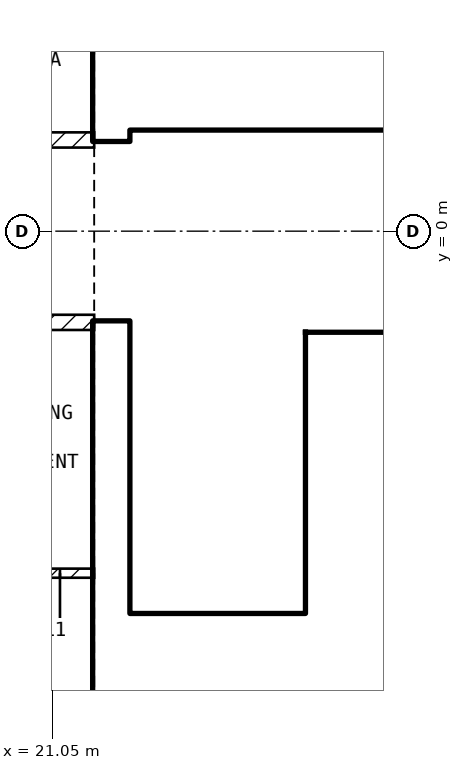
"""IFC4 building model, lengths in metres.
Left out: names, types, materials, properties, quantities, classifications, styles, units other than length and angle.
Written with IfcOpenShell. Run it as: python <this file> out.ifc"""

import sys

from ifc_helpers import new_model, si_unit, direction, frame, frame_2d, origin, place, context, subcontext, project, spatial, rectangle, extrude, element, fill, save


model = new_model("IFC4")
c1 = context("Model", 3, precision=1e-05, world=origin(), true_north=direction((0.0, 1.0)))
c2 = subcontext(c1, "Body", "Model", "MODEL_VIEW")
j1 = project(units=[si_unit("LENGTHUNIT", "METRE"), si_unit("PLANEANGLEUNIT", "RADIAN")], contexts=[c1])
p1 = place(None, origin())
s1 = spatial("IfcSite", under=j1, at=p1, CompositionType="ELEMENT")
p2 = place(p1, origin())
s2 = spatial("IfcBuilding", under=s1, at=p2, CompositionType="ELEMENT")
p3 = place(p2, frame((0.0, 0.0, 177.1)))
s3 = spatial("IfcBuildingStorey", under=s2, at=p3, CompositionType="ELEMENT", Elevation=177.1)
for number, where, z_axis, x_axis in (
    (1, (21.825, -8.1, 0.0), (0.0, 0.0, 1.0), (0.0, 1.0, 0.0)),
    (2, (21.825, 1.2, 0.0), (0.0, 0.0, 1.0), (0.0, 1.0, 0.0)),
):
    element("IfcWall", number, at=place(p3, frame(where, z_axis=z_axis, x_axis=x_axis)), inside=s3, PredefinedType="SHEAR", context=c2, shape_type="SweptSolid", body=[
        extrude(rectangle(XDim=6.9, YDim=0.45, at=frame_2d((3.45, 0.0))), origin(), (0.0, 0.0, 1.0), 3.25),
    ])
p4 = place(p3, frame((22.05, 1.45, 0.0), z_axis=(0.0, 0.0, 1.0), x_axis=(1.0, 0.0, 0.0)))
e3 = element("IfcWall", 3, at=p4, inside=s3, PredefinedType="SOLIDWALL", context=c2, shape_type="SweptSolid", body=[
    extrude(rectangle(XDim=11.15, YDim=0.2, at=frame_2d((5.575, 0.0))), origin(), (0.0, 0.0, 1.0), 3.25),
])
p5 = place(p4, frame((0.75, 0.0, 0.0)))
e4 = element("IfcOpeningElement", 4, at=p5, cuts=e3, PredefinedType="OPENING", context=c2, shape_type="SweptSolid", body=[
    extrude(rectangle(XDim=1.0, YDim=2.1, at=frame_2d((0.5, 1.05))), frame((0.0, 0.11, 0.0), z_axis=(0.0, -1.0, 0.0), x_axis=(1.0, 0.0, 0.0)), (0.0, 0.0, 1.0), 0.22),
])
p6 = place(p4, frame((3.25, 0.0, 0.0)))
e5 = element("IfcOpeningElement", 5, at=p6, cuts=e3, PredefinedType="OPENING", context=c2, shape_type="SweptSolid", body=[
    extrude(rectangle(XDim=1.0, YDim=2.1, at=frame_2d((0.5, 1.05))), frame((0.0, 0.11, 0.0), z_axis=(0.0, -1.0, 0.0), x_axis=(1.0, 0.0, 0.0)), (0.0, 0.0, 1.0), 0.22),
])
p7 = place(p4, frame((9.15, 0.0, 0.0)))
e6 = element("IfcOpeningElement", 6, at=p7, cuts=e3, PredefinedType="OPENING", context=c2, shape_type="SweptSolid", body=[
    extrude(rectangle(XDim=0.9, YDim=2.1, at=frame_2d((0.45, 1.05))), frame((0.0, 0.11, 0.0), z_axis=(0.0, -1.0, 0.0), x_axis=(1.0, 0.0, 0.0)), (0.0, 0.0, 1.0), 0.22),
])
p8 = place(p3, frame((24.5, -5.05, 0.0), z_axis=(0.0, 0.0, 1.0), x_axis=(0.0, 1.0, 0.0)))
e7 = element("IfcWall", 7, at=p8, inside=s3, PredefinedType="SOLIDWALL", context=c2, shape_type="SweptSolid", body=[
    extrude(rectangle(XDim=3.7, YDim=0.2, at=frame_2d((1.85, 0.0))), origin(), (0.0, 0.0, 1.0), 3.25),
])
p9 = place(p8, frame((0.1, 0.0, 0.0)))
e8 = element("IfcOpeningElement", 8, at=p9, cuts=e7, PredefinedType="OPENING", context=c2, shape_type="SweptSolid", body=[
    extrude(rectangle(XDim=0.8, YDim=2.1, at=frame_2d((0.4, 1.05))), frame((0.0, 0.11, 0.0), z_axis=(0.0, -1.0, 0.0), x_axis=(1.0, 0.0, 0.0)), (0.0, 0.0, 1.0), 0.22),
])
p10 = place(p3, frame((22.05, -5.15, 0.0), z_axis=(0.0, 0.0, 1.0), x_axis=(1.0, 0.0, 0.0)))
e9 = element("IfcWall", 9, at=p10, inside=s3, PredefinedType="SOLIDWALL", context=c2, shape_type="SweptSolid", body=[
    extrude(rectangle(XDim=6.3, YDim=0.2, at=frame_2d((3.15, 0.0))), origin(), (0.0, 0.0, 1.0), 3.25),
])
p11 = place(p10, frame((0.2, 0.0, 0.0)))
e10 = element("IfcOpeningElement", 10, at=p11, cuts=e9, PredefinedType="OPENING", context=c2, shape_type="SweptSolid", body=[
    extrude(rectangle(XDim=1.0, YDim=2.1, at=frame_2d((0.5, 1.05))), frame((0.0, 0.11, 0.0), z_axis=(0.0, -1.0, 0.0), x_axis=(1.0, 0.0, 0.0)), (0.0, 0.0, 1.0), 0.22),
])
p12 = place(p3, frame((24.6, -1.45, 0.0), z_axis=(0.0, 0.0, 1.0), x_axis=(1.0, 0.0, 0.0)))
e11 = element("IfcWall", 11, at=p12, inside=s3, PredefinedType="SOLIDWALL", context=c2, shape_type="SweptSolid", body=[
    extrude(rectangle(XDim=8.6, YDim=0.2, at=frame_2d((4.3, 0.0))), origin(), (0.0, 0.0, 1.0), 3.25),
])
p13 = place(p12, frame((0.4, 0.0, 0.0)))
e12 = element("IfcOpeningElement", 12, at=p13, cuts=e11, PredefinedType="OPENING", context=c2, shape_type="SweptSolid", body=[
    extrude(rectangle(XDim=1.0, YDim=2.1, at=frame_2d((0.5, 1.05))), frame((0.0, 0.11, 0.0), z_axis=(0.0, -1.0, 0.0), x_axis=(1.0, 0.0, 0.0)), (0.0, 0.0, 1.0), 0.22),
])
p14 = place(p12, frame((2.4, 0.0, 0.0)))
e13 = element("IfcOpeningElement", 13, at=p14, cuts=e11, PredefinedType="OPENING", context=c2, shape_type="SweptSolid", body=[
    extrude(rectangle(XDim=1.0, YDim=2.1, at=frame_2d((0.5, 1.05))), frame((0.0, 0.11, 0.0), z_axis=(0.0, -1.0, 0.0), x_axis=(1.0, 0.0, 0.0)), (0.0, 0.0, 1.0), 0.22),
])
p15 = place(p12, frame((4.4, 0.0, 0.0)))
e14 = element("IfcOpeningElement", 14, at=p15, cuts=e11, PredefinedType="OPENING", context=c2, shape_type="SweptSolid", body=[
    extrude(rectangle(XDim=1.0, YDim=2.1, at=frame_2d((0.5, 1.05))), frame((0.0, 0.11, 0.0), z_axis=(0.0, -1.0, 0.0), x_axis=(1.0, 0.0, 0.0)), (0.0, 0.0, 1.0), 0.22),
])
p16 = place(p12, frame((6.85, 0.0, 0.0)))
e15 = element("IfcOpeningElement", 15, at=p16, cuts=e11, PredefinedType="OPENING", context=c2, shape_type="SweptSolid", body=[
    extrude(rectangle(XDim=0.9, YDim=2.1, at=frame_2d((0.45, 1.05))), frame((0.0, 0.11, 0.0), z_axis=(0.0, -1.0, 0.0), x_axis=(1.0, 0.0, 0.0)), (0.0, 0.0, 1.0), 0.22),
])
p17 = place(p3, frame((24.6, -3.95, 0.0), z_axis=(0.0, 0.0, 1.0), x_axis=(1.0, 0.0, 0.0)))
e16 = element("IfcWall", 16, at=p17, inside=s3, PredefinedType="SOLIDWALL", context=c2, shape_type="SweptSolid", body=[
    extrude(rectangle(XDim=8.6, YDim=0.2, at=frame_2d((4.3, 0.0))), origin(), (0.0, 0.0, 1.0), 3.25),
])
p18 = place(p3, frame((4.4, 1.2, 0.0), z_axis=(0.0, 0.0, 1.0), x_axis=(1.0, 0.0, 0.0)))
e17 = element("IfcWall", 17, at=p18, inside=s3, PredefinedType="PARTITIONING", context=c2, shape_type="SweptSolid", body=[
    extrude(rectangle(XDim=17.2, YDim=0.2, at=frame_2d((8.6, 0.0))), origin(), (0.0, 0.0, 1.0), 3.25),
])
p19 = place(p18, frame((8.675, 0.0, 0.0)))
e18 = element("IfcOpeningElement", 18, at=p19, cuts=e17, PredefinedType="OPENING", context=c2, shape_type="SweptSolid", body=[
    extrude(rectangle(XDim=1.0, YDim=2.1, at=frame_2d((0.5, 1.05))), frame((0.0, 0.11, 0.0), z_axis=(0.0, -1.0, 0.0), x_axis=(1.0, 0.0, 0.0)), (0.0, 0.0, 1.0), 0.22),
])
p20 = place(p3, frame((21.6, -1.2, 0.0), z_axis=(0.0, 0.0, 1.0), x_axis=(-1.0, 0.0, 0.0)))
e19 = element("IfcWall", 19, at=p20, inside=s3, PredefinedType="PARTITIONING", context=c2, shape_type="SweptSolid", body=[
    extrude(rectangle(XDim=17.2, YDim=0.2, at=frame_2d((8.6, 0.0))), origin(), (0.0, 0.0, 1.0), 3.25),
])
p21 = place(p20, frame((10.3, 0.0, 0.0)))
e20 = element("IfcOpeningElement", 20, at=p21, cuts=e19, PredefinedType="OPENING", context=c2, shape_type="SweptSolid", body=[
    extrude(rectangle(XDim=1.0, YDim=2.1, at=frame_2d((0.5, 1.05))), frame((0.0, 0.11, 0.0), z_axis=(0.0, -1.0, 0.0), x_axis=(1.0, 0.0, 0.0)), (0.0, 0.0, 1.0), 0.22),
])
p22 = place(p3, frame((21.6, -4.5, 0.0), z_axis=(0.0, 0.0, 1.0), x_axis=(-1.0, 0.0, 0.0)))
e21 = element("IfcWall", 21, at=p22, inside=s3, PredefinedType="PARTITIONING", context=c2, shape_type="SweptSolid", body=[
    extrude(rectangle(XDim=1.8, YDim=0.12, at=frame_2d((0.9, 0.0))), origin(), (0.0, 0.0, 1.0), 3.25),
])
p23 = place(p22, frame((0.45, 0.0, 0.0)))
e22 = element("IfcOpeningElement", 22, at=p23, cuts=e21, PredefinedType="OPENING", context=c2, shape_type="SweptSolid", body=[
    extrude(rectangle(XDim=0.9, YDim=2.1, at=frame_2d((0.45, 1.05))), frame((0.0, 0.07, 0.0), z_axis=(0.0, -1.0, 0.0), x_axis=(1.0, 0.0, 0.0)), (0.0, 0.0, 1.0), 0.14),
])
p24 = place(p13, origin())
e23 = element("IfcDoor", 23, at=p24, inside=s3, OperationType="DOUBLE_DOOR_SLIDING", PredefinedType="DOOR", context=c2, shape_type="SweptSolid", body=[
    extrude(rectangle(XDim=1.0, YDim=2.1, at=frame_2d((0.5, 1.05))), frame((0.0, 0.025, 0.0), z_axis=(0.0, -1.0, 0.0), x_axis=(1.0, 0.0, 0.0)), (0.0, 0.0, 1.0), 0.05),
])
fill(e12, e23)
p25 = place(p11, origin())
e24 = element("IfcDoor", 24, at=p25, inside=s3, OperationType="SINGLE_SWING_LEFT", PredefinedType="DOOR", context=c2, shape_type="SweptSolid", body=[
    extrude(rectangle(XDim=1.0, YDim=2.1, at=frame_2d((0.5, 1.05))), frame((0.0, 0.025, 0.0), z_axis=(0.0, -1.0, 0.0), x_axis=(1.0, 0.0, 0.0)), (0.0, 0.0, 1.0), 0.05),
])
fill(e10, e24)
p26 = place(p5, origin())
e25 = element("IfcDoor", 25, at=p26, inside=s3, OperationType="SINGLE_SWING_LEFT", PredefinedType="DOOR", context=c2, shape_type="SweptSolid", body=[
    extrude(rectangle(XDim=1.0, YDim=2.1, at=frame_2d((0.5, 1.05))), frame((0.0, 0.025, 0.0), z_axis=(0.0, -1.0, 0.0), x_axis=(1.0, 0.0, 0.0)), (0.0, 0.0, 1.0), 0.05),
])
fill(e4, e25)
p27 = place(p9, origin())
e26 = element("IfcDoor", 26, at=p27, inside=s3, OperationType="SINGLE_SWING_LEFT", PredefinedType="DOOR", context=c2, shape_type="SweptSolid", body=[
    extrude(rectangle(XDim=0.8, YDim=2.1, at=frame_2d((0.4, 1.05))), frame((0.0, 0.025, 0.0), z_axis=(0.0, -1.0, 0.0), x_axis=(1.0, 0.0, 0.0)), (0.0, 0.0, 1.0), 0.05),
])
fill(e8, e26)
p28 = place(p6, origin())
e27 = element("IfcDoor", 27, at=p28, inside=s3, OperationType="SINGLE_SWING_LEFT", PredefinedType="DOOR", context=c2, shape_type="SweptSolid", body=[
    extrude(rectangle(XDim=1.0, YDim=2.1, at=frame_2d((0.5, 1.05))), frame((0.0, 0.025, 0.0), z_axis=(0.0, -1.0, 0.0), x_axis=(1.0, 0.0, 0.0)), (0.0, 0.0, 1.0), 0.05),
])
fill(e5, e27)
p29 = place(p23, origin())
e28 = element("IfcDoor", 28, at=p29, inside=s3, OperationType="SINGLE_SWING_LEFT", PredefinedType="DOOR", context=c2, shape_type="SweptSolid", body=[
    extrude(rectangle(XDim=0.9, YDim=2.1, at=frame_2d((0.45, 1.05))), frame((0.0, 0.025, 0.0), z_axis=(0.0, -1.0, 0.0), x_axis=(1.0, 0.0, 0.0)), (0.0, 0.0, 1.0), 0.05),
])
fill(e22, e28)
save(model, sys.argv[1])
